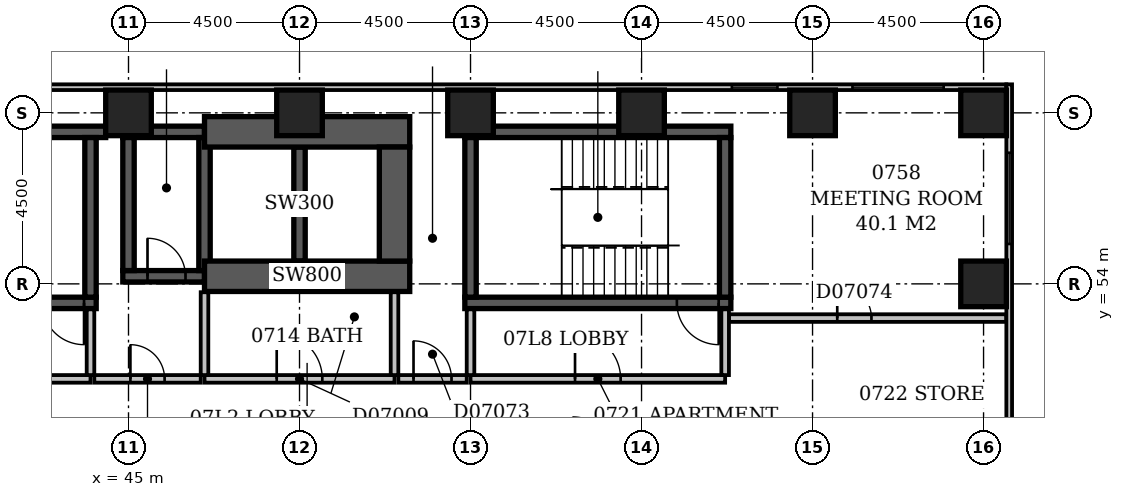
"""IFC4 building model, lengths in metres.
Left out: names, types, materials, properties, quantities, classifications, styles, units other than length and angle.
Written with IfcOpenShell. Run it as: python <this file> out.ifc"""

import sys

from ifc_helpers import new_model, si_unit, direction, frame, frame_2d, origin, origin_2d, place, context, subcontext, project, spatial, rectangle, extrude, element, fill, save


model = new_model("IFC4")
c1 = context("Model", 3, precision=1e-05, world=origin(), true_north=direction((0.0, 1.0)))
c2 = subcontext(c1, "Body", "Model", "MODEL_VIEW")
j1 = project(units=[si_unit("LENGTHUNIT", "METRE"), si_unit("PLANEANGLEUNIT", "RADIAN")], contexts=[c1])
p1 = place(None, origin())
s1 = spatial("IfcSite", under=j1, at=p1, CompositionType="ELEMENT")
p2 = place(p1, origin())
s2 = spatial("IfcBuilding", under=s1, at=p2, CompositionType="ELEMENT")
p3 = place(p2, frame((0.0, 0.0, 36.2)))
s3 = spatial("IfcBuildingStorey", under=s2, at=p3, CompositionType="ELEMENT", Elevation=36.2)
p4 = place(p3, frame((36.6, 58.0, -0.3), z_axis=(0.0, 0.0, 1.0), x_axis=(1.0, 0.0, 0.0)))
e1 = element("IfcWall", 1, at=p4, inside=s3, PredefinedType="SHEAR", context=c2, shape_type="SweptSolid", body=[
    extrude(rectangle(XDim=7.8, YDim=0.3, at=frame_2d((3.9, 0.0))), origin(), (0.0, 0.0, 1.0), 3.6),
])
p5 = place(p3, frame((37.15, 53.5, -0.3), z_axis=(0.0, 0.0, 1.0), x_axis=(1.0, 0.0, 0.0)))
e2 = element("IfcWall", 2, at=p5, inside=s3, PredefinedType="SHEAR", context=c2, shape_type="SweptSolid", body=[
    extrude(rectangle(XDim=7.0, YDim=0.3, at=frame_2d((3.5, 0.0))), origin(), (0.0, 0.0, 1.0), 3.6),
])
p6 = place(p5, frame((5.58, 0.0, 0.3)))
e3 = element("IfcOpeningElement", 3, at=p6, cuts=e2, PredefinedType="OPENING", context=c2, shape_type="SweptSolid", body=[
    extrude(rectangle(XDim=1.1, YDim=2.1, at=frame_2d((0.55, 1.05))), frame((0.0, 0.162, 0.0), z_axis=(0.0, -1.0, 0.0), x_axis=(1.0, 0.0, 0.0)), (0.0, 0.0, 1.0), 0.324),
])
p7 = place(p3, frame((44.0, 53.65, -0.3), z_axis=(0.0, 0.0, 1.0), x_axis=(0.0, 1.0, 0.0)))
e4 = element("IfcWall", 4, at=p7, inside=s3, PredefinedType="SHEAR", context=c2, shape_type="SweptSolid", body=[
    extrude(rectangle(XDim=4.2, YDim=0.3, at=frame_2d((2.1, 0.0))), origin(), (0.0, 0.0, 1.0), 3.6),
])
p8 = place(p3, frame((44.85, 54.2, -0.3), z_axis=(0.0, 0.0, 1.0), x_axis=(1.0, 0.0, 0.0)))
e5 = element("IfcWall", 5, at=p8, inside=s3, PredefinedType="SHEAR", context=c2, shape_type="SweptSolid", body=[
    extrude(rectangle(XDim=2.15, YDim=0.3, at=frame_2d((1.075, 0.0))), origin(), (0.0, 0.0, 1.0), 3.6),
])
p9 = place(p8, frame((0.65, 0.0, 0.3)))
e6 = element("IfcOpeningElement", 6, at=p9, cuts=e5, PredefinedType="OPENING", context=c2, shape_type="SweptSolid", body=[
    extrude(rectangle(XDim=1.0, YDim=2.1, at=frame_2d((0.5, 1.05))), frame((0.0, 0.162, 0.0), z_axis=(0.0, -1.0, 0.0), x_axis=(1.0, 0.0, 0.0)), (0.0, 0.0, 1.0), 0.324),
])
p10 = place(p3, frame((44.85, 58.0, -0.3), z_axis=(0.0, 0.0, 1.0), x_axis=(1.0, 0.0, 0.0)))
e7 = element("IfcWall", 7, at=p10, inside=s3, PredefinedType="SHEAR", context=c2, shape_type="SweptSolid", body=[
    extrude(rectangle(XDim=2.15, YDim=0.3, at=frame_2d((1.075, 0.0))), origin(), (0.0, 0.0, 1.0), 3.6),
])
p11 = place(p3, frame((45.0, 54.35, -0.3), z_axis=(0.0, 0.0, 1.0), x_axis=(0.0, 1.0, 0.0)))
e8 = element("IfcWall", 8, at=p11, inside=s3, PredefinedType="SHEAR", context=c2, shape_type="SweptSolid", body=[
    extrude(rectangle(XDim=3.5, YDim=0.3, at=frame_2d((1.75, 0.0))), origin(), (0.0, 0.0, 1.0), 3.6),
])
p12 = place(p3, frame((47.0, 54.2, -0.3), z_axis=(0.0, 0.0, 1.0), x_axis=(1.0, 0.0, 0.0)))
e9 = element("IfcWall", 9, at=p12, inside=s3, PredefinedType="SHEAR", context=c2, shape_type="SweptSolid", body=[
    extrude(rectangle(XDim=5.4, YDim=0.8, at=frame_2d((2.7, 0.0))), origin(), (0.0, 0.0, 1.0), 3.6),
])
p13 = place(p3, frame((47.0, 54.35, -0.3), z_axis=(0.0, 0.0, 1.0), x_axis=(0.0, 1.0, 0.0)))
e10 = element("IfcWall", 10, at=p13, inside=s3, PredefinedType="SHEAR", context=c2, shape_type="SweptSolid", body=[
    extrude(rectangle(XDim=3.5, YDim=0.3, at=frame_2d((1.75, 0.0))), origin(), (0.0, 0.0, 1.0), 3.6),
])
p14 = place(p3, frame((47.0, 58.0, -0.3), z_axis=(0.0, 0.0, 1.0), x_axis=(1.0, 0.0, 0.0)))
e11 = element("IfcWall", 11, at=p14, inside=s3, PredefinedType="SHEAR", context=c2, shape_type="SweptSolid", body=[
    extrude(rectangle(XDim=5.4, YDim=0.8, at=frame_2d((2.7, 0.0))), origin(), (0.0, 0.0, 1.0), 3.6),
])
p15 = place(p3, frame((49.5, 54.6, -0.3), z_axis=(0.0, 0.0, 1.0), x_axis=(0.0, 1.0, 0.0)))
e12 = element("IfcWall", 12, at=p15, inside=s3, PredefinedType="SHEAR", context=c2, shape_type="SweptSolid", body=[
    extrude(rectangle(XDim=3.0, YDim=0.3, at=frame_2d((1.5, 0.0))), origin(), (0.0, 0.0, 1.0), 3.6),
])
p16 = place(p3, frame((52.0, 54.6, -0.3), z_axis=(0.0, 0.0, 1.0), x_axis=(0.0, 1.0, 0.0)))
e13 = element("IfcWall", 13, at=p16, inside=s3, PredefinedType="SHEAR", context=c2, shape_type="SweptSolid", body=[
    extrude(rectangle(XDim=3.0, YDim=0.8, at=frame_2d((1.5, 0.0))), origin(), (0.0, 0.0, 1.0), 3.6),
])
p17 = place(p3, frame((53.85, 53.5, -0.3), z_axis=(0.0, 0.0, 1.0), x_axis=(1.0, 0.0, 0.0)))
e14 = element("IfcWall", 14, at=p17, inside=s3, PredefinedType="SHEAR", context=c2, shape_type="SweptSolid", body=[
    extrude(rectangle(XDim=7.0, YDim=0.3, at=frame_2d((3.5, 0.0))), origin(), (0.0, 0.0, 1.0), 3.6),
])
p18 = place(p17, frame((5.58, 0.0, 0.3)))
e15 = element("IfcOpeningElement", 15, at=p18, cuts=e14, PredefinedType="OPENING", context=c2, shape_type="SweptSolid", body=[
    extrude(rectangle(XDim=1.1, YDim=2.1, at=frame_2d((0.55, 1.05))), frame((0.0, 0.162, 0.0), z_axis=(0.0, -1.0, 0.0), x_axis=(1.0, 0.0, 0.0)), (0.0, 0.0, 1.0), 0.324),
])
p19 = place(p3, frame((53.85, 58.0, -0.3), z_axis=(0.0, 0.0, 1.0), x_axis=(1.0, 0.0, 0.0)))
e16 = element("IfcWall", 16, at=p19, inside=s3, PredefinedType="SHEAR", context=c2, shape_type="SweptSolid", body=[
    extrude(rectangle(XDim=7.0, YDim=0.3, at=frame_2d((3.5, 0.0))), origin(), (0.0, 0.0, 1.0), 3.6),
])
for number, where, z_axis, x_axis in (
    (17, (54.0, 53.65, -0.3), (0.0, 0.0, 1.0), (0.0, 1.0, 0.0)),
    (18, (60.7, 53.65, -0.3), (0.0, 0.0, 1.0), (0.0, 1.0, 0.0)),
):
    element("IfcWall", number, at=place(p3, frame(where, z_axis=z_axis, x_axis=x_axis)), inside=s3, PredefinedType="SHEAR", context=c2, shape_type="SweptSolid", body=[
        extrude(rectangle(XDim=4.2, YDim=0.3, at=frame_2d((2.1, 0.0))), origin(), (0.0, 0.0, 1.0), 3.6),
    ])
for number, where, z_axis, x_axis in (
    (19, (67.5, 54.0, -0.3), (0.0, 0.0, 1.0), (1.0, 0.0, 0.0)),
    (20, (45.0, 58.5, -0.3), (0.0, 0.0, 1.0), (1.0, 0.0, 0.0)),
    (21, (49.5, 58.5, -0.3), (0.0, 0.0, 1.0), (1.0, 0.0, 0.0)),
    (22, (54.0, 58.5, -0.3), (0.0, 0.0, 1.0), (1.0, 0.0, 0.0)),
    (23, (58.5, 58.5, -0.3), (0.0, 0.0, 1.0), (1.0, 0.0, 0.0)),
    (24, (63.0, 58.5, -0.3), (0.0, 0.0, 1.0), (1.0, 0.0, 0.0)),
    (25, (67.5, 58.5, -0.3), (0.0, 0.0, 1.0), (1.0, 0.0, 0.0)),
):
    element("IfcColumn", number, at=place(p3, frame(where, z_axis=z_axis, x_axis=x_axis)), inside=s3, PredefinedType="COLUMN", context=c2, shape_type="SweptSolid", body=[
        extrude(rectangle(XDim=1.2, YDim=1.2, at=origin_2d()), origin(), (0.0, 0.0, 1.0), 3.6),
    ])
p20 = place(p3, frame((68.175, 35.4, 0.0), z_axis=(0.0, 0.0, 1.0), x_axis=(0.0, 1.0, 0.0)))
e26 = element("IfcWall", 26, at=p20, inside=s3, PredefinedType="STANDARD", context=c2, shape_type="SweptSolid", body=[
    extrude(rectangle(XDim=23.85, YDim=0.15, at=frame_2d((11.925, 0.0))), origin(), (0.0, 0.0, 1.0), 2.7),
])
p21 = place(p20, frame((1.65, 0.0, 0.6)))
e27 = element("IfcOpeningElement", 27, at=p21, cuts=e26, PredefinedType="OPENING", context=c2, shape_type="SweptSolid", body=[
    extrude(rectangle(XDim=2.4, YDim=1.8, at=frame_2d((1.2, 0.9))), frame((0.0, 0.087, 0.0), z_axis=(0.0, -1.0, 0.0), x_axis=(1.0, 0.0, 0.0)), (0.0, 0.0, 1.0), 0.174),
])
p22 = place(p20, frame((19.65, 0.0, 0.6)))
e28 = element("IfcOpeningElement", 28, at=p22, cuts=e26, PredefinedType="OPENING", context=c2, shape_type="SweptSolid", body=[
    extrude(rectangle(XDim=2.4, YDim=1.8, at=frame_2d((1.2, 0.9))), frame((0.0, 0.087, 0.0), z_axis=(0.0, -1.0, 0.0), x_axis=(1.0, 0.0, 0.0)), (0.0, 0.0, 1.0), 0.174),
])
p23 = place(p3, frame((68.1, 59.175, 0.0), z_axis=(0.0, 0.0, 1.0), x_axis=(-1.0, 0.0, 0.0)))
e29 = element("IfcWall", 29, at=p23, inside=s3, PredefinedType="STANDARD", context=c2, shape_type="SweptSolid", body=[
    extrude(rectangle(XDim=68.85, YDim=0.15, at=frame_2d((34.425, 0.0))), origin(), (0.0, 0.0, 1.0), 2.7),
])
p24 = place(p23, frame((1.65, 0.0, 0.6)))
e30 = element("IfcOpeningElement", 30, at=p24, cuts=e29, PredefinedType="OPENING", context=c2, shape_type="SweptSolid", body=[
    extrude(rectangle(XDim=2.4, YDim=1.8, at=frame_2d((1.2, 0.9))), frame((0.0, 0.087, 0.0), z_axis=(0.0, -1.0, 0.0), x_axis=(1.0, 0.0, 0.0)), (0.0, 0.0, 1.0), 0.174),
])
p25 = place(p23, frame((6.023, 0.0, 0.6)))
e31 = element("IfcOpeningElement", 31, at=p25, cuts=e29, PredefinedType="OPENING", context=c2, shape_type="SweptSolid", body=[
    extrude(rectangle(XDim=1.2, YDim=1.8, at=frame_2d((0.6, 0.9))), frame((0.0, 0.087, 0.0), z_axis=(0.0, -1.0, 0.0), x_axis=(1.0, 0.0, 0.0)), (0.0, 0.0, 1.0), 0.174),
])
p26 = place(p23, frame((37.65, 0.0, 0.6)))
e32 = element("IfcOpeningElement", 32, at=p26, cuts=e29, PredefinedType="OPENING", context=c2, shape_type="SweptSolid", body=[
    extrude(rectangle(XDim=2.4, YDim=1.8, at=frame_2d((1.2, 0.9))), frame((0.0, 0.087, 0.0), z_axis=(0.0, -1.0, 0.0), x_axis=(1.0, 0.0, 0.0)), (0.0, 0.0, 1.0), 0.174),
])
p27 = place(p3, frame((47.0, 51.5, 0.0), z_axis=(0.0, 0.0, 1.0), x_axis=(1.0, 0.0, 0.0)))
e33 = element("IfcWall", 33, at=p27, inside=s3, PredefinedType="PARTITIONING", context=c2, shape_type="SweptSolid", body=[
    extrude(rectangle(XDim=5.0, YDim=0.2, at=frame_2d((2.5, 0.0))), origin(), (0.0, 0.0, 1.0), 3.3),
])
p28 = place(p27, frame((1.9, 0.0, 0.0)))
e34 = element("IfcOpeningElement", 34, at=p28, cuts=e33, PredefinedType="OPENING", context=c2, shape_type="SweptSolid", body=[
    extrude(rectangle(XDim=1.2, YDim=2.1, at=frame_2d((0.6, 1.05))), frame((0.0, 0.112, 0.0), z_axis=(0.0, -1.0, 0.0), x_axis=(1.0, 0.0, 0.0)), (0.0, 0.0, 1.0), 0.224),
])
for number, where, z_axis, x_axis in (
    (35, (52.0, 51.6, 0.0), (0.0, 0.0, 1.0), (0.0, 1.0, 0.0)),
    (36, (47.0, 51.6, 0.0), (0.0, 0.0, 1.0), (0.0, 1.0, 0.0)),
):
    element("IfcWall", number, at=place(p3, frame(where, z_axis=z_axis, x_axis=x_axis)), inside=s3, PredefinedType="PARTITIONING", context=c2, shape_type="SweptSolid", body=[
        extrude(rectangle(XDim=2.18, YDim=0.2, at=frame_2d((1.09, 0.0))), origin(), (0.0, 0.0, 1.0), 3.3),
    ])
p29 = place(p3, frame((37.3, 51.5, 0.0), z_axis=(0.0, 0.0, 1.0), x_axis=(1.0, 0.0, 0.0)))
e37 = element("IfcWall", 37, at=p29, inside=s3, PredefinedType="PARTITIONING", context=c2, shape_type="SweptSolid", body=[
    extrude(rectangle(XDim=6.7, YDim=0.2, at=frame_2d((3.35, 0.0))), origin(), (0.0, 0.0, 1.0), 3.3),
])
p30 = place(p29, frame((2.75, 0.0, 0.0)))
e38 = element("IfcOpeningElement", 38, at=p30, cuts=e37, PredefinedType="OPENING", context=c2, shape_type="SweptSolid", body=[
    extrude(rectangle(XDim=1.2, YDim=2.1, at=frame_2d((0.6, 1.05))), frame((0.0, 0.112, 0.0), z_axis=(0.0, -1.0, 0.0), x_axis=(1.0, 0.0, 0.0)), (0.0, 0.0, 1.0), 0.224),
])
p31 = place(p3, frame((44.0, 51.6, 0.0), z_axis=(0.0, 0.0, 1.0), x_axis=(0.0, 1.0, 0.0)))
e39 = element("IfcWall", 39, at=p31, inside=s3, PredefinedType="PARTITIONING", context=c2, shape_type="SweptSolid", body=[
    extrude(rectangle(XDim=1.73, YDim=0.2, at=frame_2d((0.865, 0.0))), origin(), (0.0, 0.0, 1.0), 3.3),
])
p32 = place(p3, frame((54.0, 51.5, 0.0), z_axis=(0.0, 0.0, 1.0), x_axis=(1.0, 0.0, 0.0)))
e40 = element("IfcWall", 40, at=p32, inside=s3, PredefinedType="PARTITIONING", context=c2, shape_type="SweptSolid", body=[
    extrude(rectangle(XDim=6.7, YDim=0.2, at=frame_2d((3.35, 0.0))), origin(), (0.0, 0.0, 1.0), 3.3),
])
p33 = place(p32, frame((2.75, 0.0, 0.0)))
e41 = element("IfcOpeningElement", 41, at=p33, cuts=e40, PredefinedType="OPENING", context=c2, shape_type="SweptSolid", body=[
    extrude(rectangle(XDim=1.2, YDim=2.1, at=frame_2d((0.6, 1.05))), frame((0.0, 0.112, 0.0), z_axis=(0.0, -1.0, 0.0), x_axis=(1.0, 0.0, 0.0)), (0.0, 0.0, 1.0), 0.224),
])
p34 = place(p3, frame((60.7, 51.6, 0.0), z_axis=(0.0, 0.0, 1.0), x_axis=(0.0, 1.0, 0.0)))
e42 = element("IfcWall", 42, at=p34, inside=s3, PredefinedType="PARTITIONING", context=c2, shape_type="SweptSolid", body=[
    extrude(rectangle(XDim=1.73, YDim=0.2, at=frame_2d((0.865, 0.0))), origin(), (0.0, 0.0, 1.0), 3.3),
])
p35 = place(p3, frame((54.0, 51.6, 0.0), z_axis=(0.0, 0.0, 1.0), x_axis=(0.0, 1.0, 0.0)))
e43 = element("IfcWall", 43, at=p35, inside=s3, PredefinedType="PARTITIONING", context=c2, shape_type="SweptSolid", body=[
    extrude(rectangle(XDim=1.73, YDim=0.2, at=frame_2d((0.865, 0.0))), origin(), (0.0, 0.0, 1.0), 2.6),
])
p36 = place(p3, frame((44.1, 51.5, 0.0), z_axis=(0.0, 0.0, 1.0), x_axis=(1.0, 0.0, 0.0)))
e44 = element("IfcWall", 44, at=p36, inside=s3, PredefinedType="PARTITIONING", context=c2, shape_type="SweptSolid", body=[
    extrude(rectangle(XDim=2.8, YDim=0.2, at=frame_2d((1.4, 0.0))), origin(), (0.0, 0.0, 1.0), 3.3),
])
p37 = place(p36, frame((0.95, 0.0, 0.0)))
e45 = element("IfcOpeningElement", 45, at=p37, cuts=e44, PredefinedType="OPENING", context=c2, shape_type="SweptSolid", body=[
    extrude(rectangle(XDim=0.9, YDim=2.1, at=frame_2d((0.45, 1.05))), frame((0.0, 0.112, 0.0), z_axis=(0.0, -1.0, 0.0), x_axis=(1.0, 0.0, 0.0)), (0.0, 0.0, 1.0), 0.224),
])
p38 = place(p3, frame((52.1, 51.5, 0.0), z_axis=(0.0, 0.0, 1.0), x_axis=(1.0, 0.0, 0.0)))
e46 = element("IfcWall", 46, at=p38, inside=s3, PredefinedType="PARTITIONING", context=c2, shape_type="SweptSolid", body=[
    extrude(rectangle(XDim=1.8, YDim=0.2, at=frame_2d((0.9, 0.0))), origin(), (0.0, 0.0, 1.0), 3.3),
])
p39 = place(p38, frame((0.4, 0.0, 0.0)))
e47 = element("IfcOpeningElement", 47, at=p39, cuts=e46, PredefinedType="OPENING", context=c2, shape_type="SweptSolid", body=[
    extrude(rectangle(XDim=1.0, YDim=2.1, at=frame_2d((0.5, 1.05))), frame((0.0, 0.112, 0.0), z_axis=(0.0, -1.0, 0.0), x_axis=(1.0, 0.0, 0.0)), (0.0, 0.0, 1.0), 0.224),
])
p40 = place(p3, frame((60.8, 53.1, 0.0), z_axis=(0.0, 0.0, 1.0), x_axis=(1.0, 0.0, 0.0)))
e48 = element("IfcWall", 48, at=p40, inside=s3, PredefinedType="PARTITIONING", context=c2, shape_type="SweptSolid", body=[
    extrude(rectangle(XDim=7.3, YDim=0.2, at=frame_2d((3.65, 0.0))), origin(), (0.0, 0.0, 1.0), 3.3),
])
p41 = place(p40, frame((2.85, 0.0, 0.0)))
e49 = element("IfcOpeningElement", 49, at=p41, cuts=e48, PredefinedType="OPENING", context=c2, shape_type="SweptSolid", body=[
    extrude(rectangle(XDim=0.9, YDim=2.1, at=frame_2d((0.45, 1.05))), frame((0.0, 0.112, 0.0), z_axis=(0.0, -1.0, 0.0), x_axis=(1.0, 0.0, 0.0)), (0.0, 0.0, 1.0), 0.224),
])
p42 = place(p22, origin())
e50 = element("IfcWindow", 50, at=p42, inside=s3, PartitioningType="SINGLE_PANEL", PredefinedType="WINDOW", context=c2, shape_type="SweptSolid", body=[
    extrude(rectangle(XDim=2.4, YDim=1.8, at=frame_2d((1.2, 0.9))), frame((0.0, 0.03, 0.0), z_axis=(0.0, -1.0, 0.0), x_axis=(1.0, 0.0, 0.0)), (0.0, 0.0, 1.0), 0.06),
])
fill(e28, e50)
p43 = place(p24, origin())
e51 = element("IfcWindow", 51, at=p43, inside=s3, PartitioningType="SINGLE_PANEL", PredefinedType="WINDOW", context=c2, shape_type="SweptSolid", body=[
    extrude(rectangle(XDim=2.4, YDim=1.8, at=frame_2d((1.2, 0.9))), frame((0.0, 0.03, 0.0), z_axis=(0.0, -1.0, 0.0), x_axis=(1.0, 0.0, 0.0)), (0.0, 0.0, 1.0), 0.06),
])
fill(e30, e51)
p44 = place(p25, origin())
e52 = element("IfcWindow", 52, at=p44, inside=s3, PartitioningType="SINGLE_PANEL", PredefinedType="WINDOW", context=c2, shape_type="SweptSolid", body=[
    extrude(rectangle(XDim=1.2, YDim=1.8, at=frame_2d((0.6, 0.9))), frame((0.0, 0.03, 0.0), z_axis=(0.0, -1.0, 0.0), x_axis=(1.0, 0.0, 0.0)), (0.0, 0.0, 1.0), 0.06),
])
fill(e31, e52)
p45 = place(p33, origin())
e53 = element("IfcDoor", 53, at=p45, inside=s3, OperationType="SINGLE_SWING_LEFT", PredefinedType="DOOR", context=c2, shape_type="SweptSolid", body=[
    extrude(rectangle(XDim=1.2, YDim=2.1, at=frame_2d((0.6, 1.05))), frame((0.0, 0.025, 0.0), z_axis=(0.0, -1.0, 0.0), x_axis=(1.0, 0.0, 0.0)), (0.0, 0.0, 1.0), 0.05),
])
fill(e41, e53)
p46 = place(p28, origin())
e54 = element("IfcDoor", 54, at=p46, inside=s3, OperationType="SINGLE_SWING_LEFT", PredefinedType="DOOR", context=c2, shape_type="SweptSolid", body=[
    extrude(rectangle(XDim=1.2, YDim=2.1, at=frame_2d((0.6, 1.05))), frame((0.0, 0.025, 0.0), z_axis=(0.0, -1.0, 0.0), x_axis=(1.0, 0.0, 0.0)), (0.0, 0.0, 1.0), 0.05),
])
fill(e34, e54)
p47 = place(p9, origin())
e55 = element("IfcDoor", 55, at=p47, inside=s3, OperationType="SINGLE_SWING_LEFT", PredefinedType="DOOR", context=c2, shape_type="SweptSolid", body=[
    extrude(rectangle(XDim=1.0, YDim=2.1, at=frame_2d((0.5, 1.05))), frame((0.0, 0.025, 0.0), z_axis=(0.0, -1.0, 0.0), x_axis=(1.0, 0.0, 0.0)), (0.0, 0.0, 1.0), 0.05),
])
fill(e6, e55)
p48 = place(p6, origin())
e56 = element("IfcDoor", 56, at=p48, inside=s3, OperationType="SINGLE_SWING_RIGHT", PredefinedType="DOOR", context=c2, shape_type="SweptSolid", body=[
    extrude(rectangle(XDim=1.1, YDim=2.1, at=frame_2d((0.55, 1.05))), frame((0.0, 0.025, 0.0), z_axis=(0.0, -1.0, 0.0), x_axis=(1.0, 0.0, 0.0)), (0.0, 0.0, 1.0), 0.05),
])
fill(e3, e56)
p49 = place(p18, origin())
e57 = element("IfcDoor", 57, at=p49, inside=s3, OperationType="SINGLE_SWING_RIGHT", PredefinedType="DOOR", context=c2, shape_type="SweptSolid", body=[
    extrude(rectangle(XDim=1.1, YDim=2.1, at=frame_2d((0.55, 1.05))), frame((0.0, 0.025, 0.0), z_axis=(0.0, -1.0, 0.0), x_axis=(1.0, 0.0, 0.0)), (0.0, 0.0, 1.0), 0.05),
])
fill(e15, e57)
p50 = place(p37, origin())
e58 = element("IfcDoor", 58, at=p50, inside=s3, OperationType="SINGLE_SWING_LEFT", PredefinedType="DOOR", context=c2, shape_type="SweptSolid", body=[
    extrude(rectangle(XDim=0.9, YDim=2.1, at=frame_2d((0.45, 1.05))), frame((0.0, 0.025, 0.0), z_axis=(0.0, -1.0, 0.0), x_axis=(1.0, 0.0, 0.0)), (0.0, 0.0, 1.0), 0.05),
])
fill(e45, e58)
p51 = place(p39, origin())
e59 = element("IfcDoor", 59, at=p51, inside=s3, OperationType="SINGLE_SWING_LEFT", PredefinedType="DOOR", context=c2, shape_type="SweptSolid", body=[
    extrude(rectangle(XDim=1.0, YDim=2.1, at=frame_2d((0.5, 1.05))), frame((0.0, 0.025, 0.0), z_axis=(0.0, -1.0, 0.0), x_axis=(1.0, 0.0, 0.0)), (0.0, 0.0, 1.0), 0.05),
])
fill(e47, e59)
p52 = place(p41, origin())
e60 = element("IfcDoor", 60, at=p52, inside=s3, OperationType="SINGLE_SWING_LEFT", PredefinedType="DOOR", context=c2, shape_type="SweptSolid", body=[
    extrude(rectangle(XDim=0.9, YDim=2.1, at=frame_2d((0.45, 1.05))), frame((0.0, 0.025, 0.0), z_axis=(0.0, -1.0, 0.0), x_axis=(1.0, 0.0, 0.0)), (0.0, 0.0, 1.0), 0.05),
])
fill(e49, e60)
save(model, sys.argv[1])
